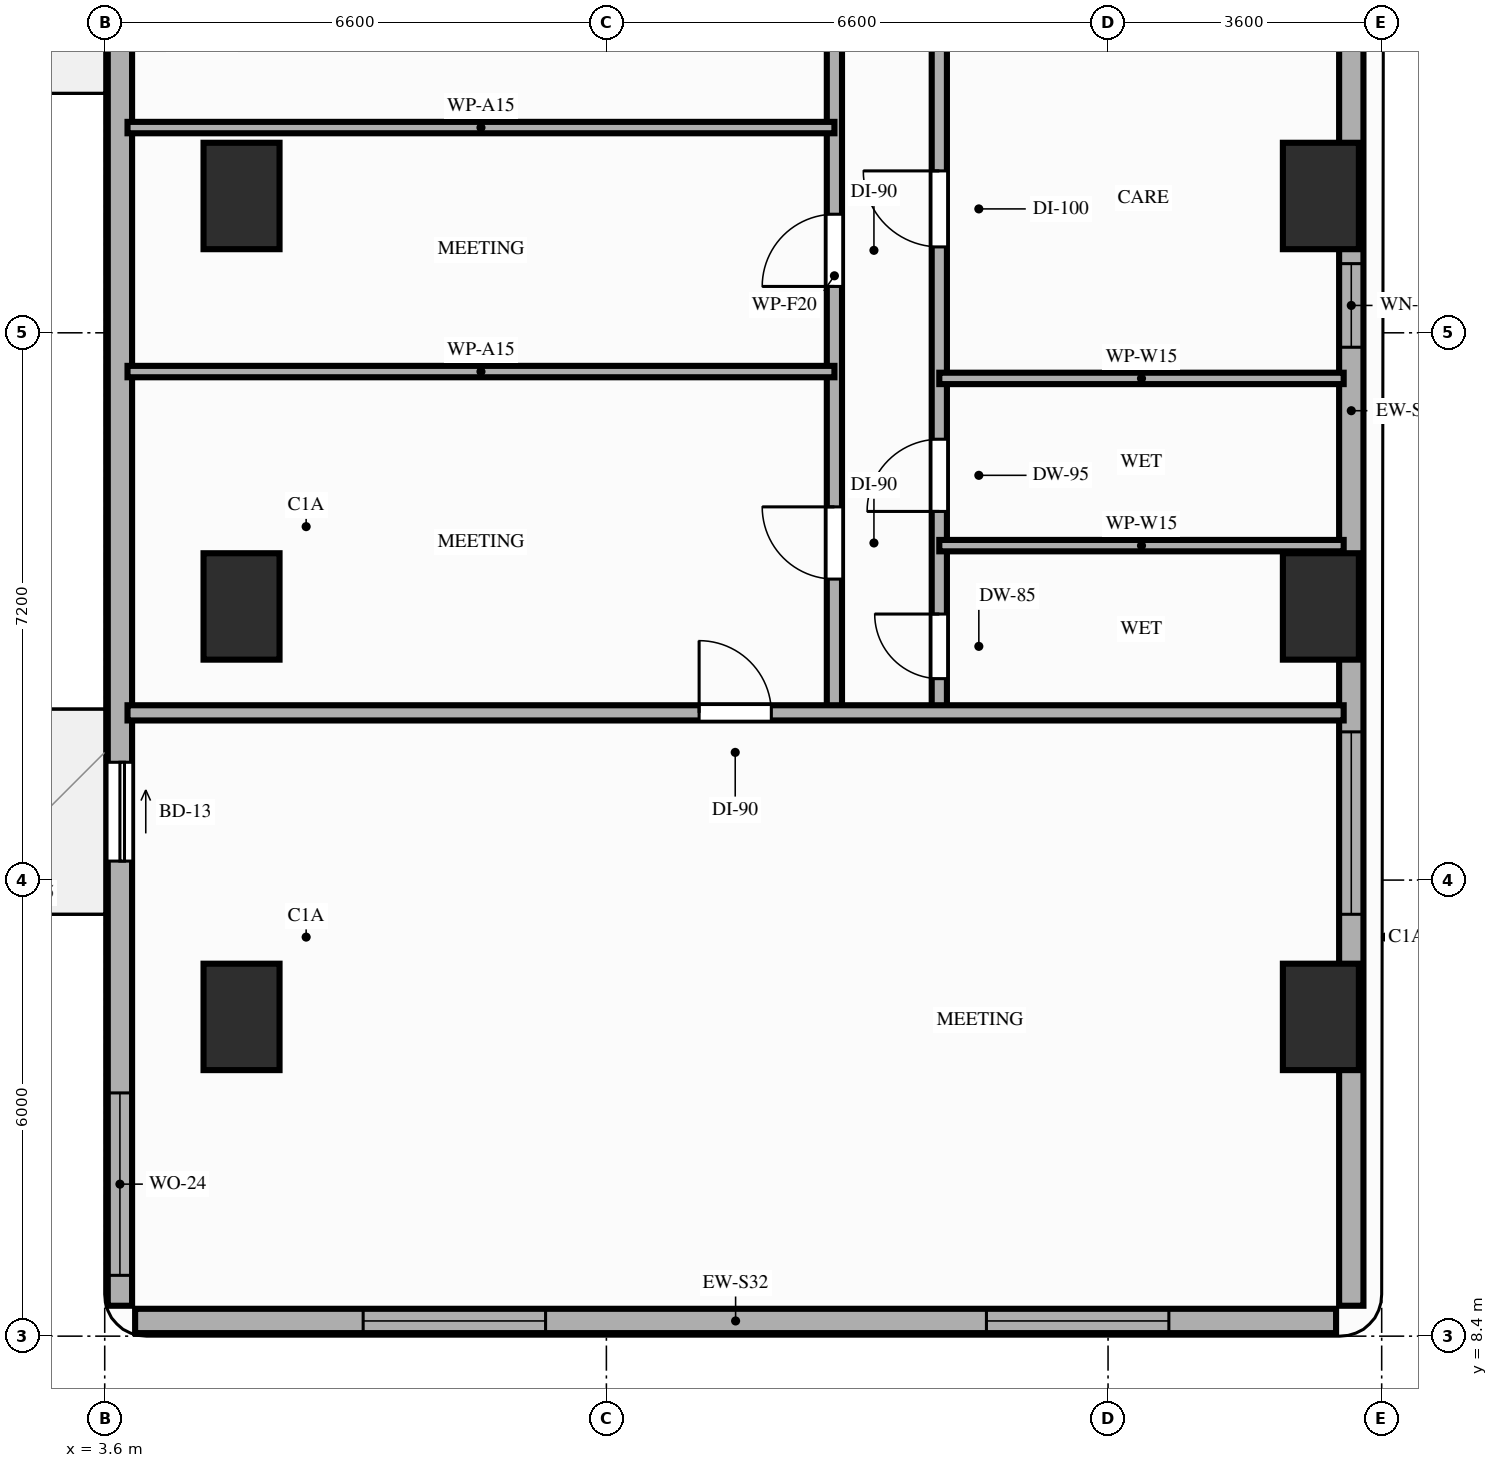
"""IFC4 building model, lengths in metres.
Left out: names, types, materials, properties, quantities, classifications, styles, units other than length and angle.
Written with IfcOpenShell. Run it as: python <this file> out.ifc"""

import sys

from ifc_helpers import new_model, si_unit, direction, frame, frame_2d, origin, origin_2d, place, context, subcontext, project, spatial, rectangle, extrude, element, fill, save


model = new_model("IFC4")
c1 = context("Model", 3, precision=1e-05, world=origin(), true_north=direction((0.0, 1.0)))
c2 = subcontext(c1, "Body", "Model", "MODEL_VIEW")
j1 = project(units=[si_unit("LENGTHUNIT", "METRE"), si_unit("PLANEANGLEUNIT", "RADIAN")], contexts=[c1])
p1 = place(None, origin())
s1 = spatial("IfcSite", under=j1, at=p1, CompositionType="ELEMENT")
p2 = place(p1, origin())
s2 = spatial("IfcBuilding", under=s1, at=p2, CompositionType="ELEMENT")
p3 = place(p2, frame((0.0, 0.0, 30.2)))
s3 = spatial("IfcBuildingStorey", under=s2, at=p3, CompositionType="ELEMENT", Elevation=30.2)
for number, where, z_axis, x_axis in (
    (1, (5.4, 12.6, 0.0), (0.0, 0.0, 1.0), (1.0, 0.0, 0.0)),
    (2, (19.6, 12.6, 0.0), (0.0, 0.0, 1.0), (1.0, 0.0, 0.0)),
    (3, (5.4, 18.0, 0.0), (0.0, 0.0, 1.0), (1.0, 0.0, 0.0)),
    (4, (19.6, 18.0, 0.0), (0.0, 0.0, 1.0), (1.0, 0.0, 0.0)),
    (5, (5.4, 23.4, 0.0), (0.0, 0.0, 1.0), (1.0, 0.0, 0.0)),
    (6, (19.6, 23.4, 0.0), (0.0, 0.0, 1.0), (1.0, 0.0, 0.0)),
):
    element("IfcColumn", number, at=place(p3, frame(where, z_axis=z_axis, x_axis=x_axis)), inside=s3, PredefinedType="COLUMN", context=c2, shape_type="SweptSolid", body=[
        extrude(rectangle(XDim=1.0, YDim=1.4, at=origin_2d()), origin(), (0.0, 0.0, 1.0), 3.2),
    ])
p4 = place(p3, frame((4.0, 8.6, 0.0), z_axis=(0.0, 0.0, 1.0), x_axis=(1.0, 0.0, 0.0)))
e7 = element("IfcWall", 7, at=p4, inside=s3, PredefinedType="STANDARD", context=c2, shape_type="SweptSolid", body=[
    extrude(rectangle(XDim=15.8, YDim=0.32, at=frame_2d((7.9, 0.0))), origin(), (0.0, 0.0, 1.0), 3.02),
])
p5 = place(p4, frame((3.0, 0.0, 0.85)))
e8 = element("IfcOpeningElement", 8, at=p5, cuts=e7, PredefinedType="OPENING", context=c2, shape_type="SweptSolid", body=[
    extrude(rectangle(XDim=2.4, YDim=1.8, at=frame_2d((1.2, 0.9))), frame((0.0, 0.17, 0.0), z_axis=(0.0, -1.0, 0.0), x_axis=(1.0, 0.0, 0.0)), (0.0, 0.0, 1.0), 0.34),
])
p6 = place(p4, frame((11.2, 0.0, 0.85)))
e9 = element("IfcOpeningElement", 9, at=p6, cuts=e7, PredefinedType="OPENING", context=c2, shape_type="SweptSolid", body=[
    extrude(rectangle(XDim=2.4, YDim=1.8, at=frame_2d((1.2, 0.9))), frame((0.0, 0.17, 0.0), z_axis=(0.0, -1.0, 0.0), x_axis=(1.0, 0.0, 0.0)), (0.0, 0.0, 1.0), 0.34),
])
p7 = place(p3, frame((3.8, 42.1, 0.0), z_axis=(0.0, 0.0, 1.0), x_axis=(0.0, -1.0, 0.0)))
e10 = element("IfcWall", 10, at=p7, inside=s3, PredefinedType="STANDARD", context=c2, shape_type="SweptSolid", body=[
    extrude(rectangle(XDim=33.3, YDim=0.32, at=frame_2d((16.65, 0.0))), origin(), (0.0, 0.0, 1.0), 2.71),
])
p8 = place(p7, frame((26.15, 0.0, 0.0)))
e11 = element("IfcOpeningElement", 11, at=p8, cuts=e10, PredefinedType="OPENING", context=c2, shape_type="SweptSolid", body=[
    extrude(rectangle(XDim=1.3, YDim=2.08, at=frame_2d((0.65, 1.04))), frame((0.0, 0.17, 0.0), z_axis=(0.0, -1.0, 0.0), x_axis=(1.0, 0.0, 0.0)), (0.0, 0.0, 1.0), 0.34),
])
p9 = place(p7, frame((15.35, 0.0, 0.0)))
e12 = element("IfcOpeningElement", 12, at=p9, cuts=e10, PredefinedType="OPENING", context=c2, shape_type="SweptSolid", body=[
    extrude(rectangle(XDim=1.3, YDim=2.08, at=frame_2d((0.65, 1.04))), frame((0.0, 0.17, 0.0), z_axis=(0.0, -1.0, 0.0), x_axis=(1.0, 0.0, 0.0)), (0.0, 0.0, 1.0), 0.34),
])
p10 = place(p7, frame((30.5, 0.0, 0.85)))
e13 = element("IfcOpeningElement", 13, at=p10, cuts=e10, PredefinedType="OPENING", context=c2, shape_type="SweptSolid", body=[
    extrude(rectangle(XDim=2.4, YDim=1.61, at=frame_2d((1.2, 0.805))), frame((0.0, 0.17, 0.0), z_axis=(0.0, -1.0, 0.0), x_axis=(1.0, 0.0, 0.0)), (0.0, 0.0, 1.0), 0.34),
])
p11 = place(p7, frame((9.6, 0.0, 0.85)))
e14 = element("IfcOpeningElement", 14, at=p11, cuts=e10, PredefinedType="OPENING", context=c2, shape_type="SweptSolid", body=[
    extrude(rectangle(XDim=2.4, YDim=1.61, at=frame_2d((1.2, 0.805))), frame((0.0, 0.17, 0.0), z_axis=(0.0, -1.0, 0.0), x_axis=(1.0, 0.0, 0.0)), (0.0, 0.0, 1.0), 0.34),
])
p12 = place(p7, frame((3.5, 0.0, 0.85)))
e15 = element("IfcOpeningElement", 15, at=p12, cuts=e10, PredefinedType="OPENING", context=c2, shape_type="SweptSolid", body=[
    extrude(rectangle(XDim=2.4, YDim=1.61, at=frame_2d((1.2, 0.805))), frame((0.0, 0.17, 0.0), z_axis=(0.0, -1.0, 0.0), x_axis=(1.0, 0.0, 0.0)), (0.0, 0.0, 1.0), 0.34),
])
p13 = place(p3, frame((20.0, 8.8, 0.0), z_axis=(0.0, 0.0, 1.0), x_axis=(0.0, 1.0, 0.0)))
e16 = element("IfcWall", 16, at=p13, inside=s3, PredefinedType="STANDARD", context=c2, shape_type="SweptSolid", body=[
    extrude(rectangle(XDim=23.55, YDim=0.32, at=frame_2d((11.775, 0.0))), origin(), (0.0, 0.0, 1.0), 2.41),
])
p14 = place(p13, frame((12.61, 0.0, 0.85)))
e17 = element("IfcOpeningElement", 17, at=p14, cuts=e16, PredefinedType="OPENING", context=c2, shape_type="SweptSolid", body=[
    extrude(rectangle(XDim=1.1, YDim=1.31, at=frame_2d((0.55, 0.655))), frame((0.0, 0.17, 0.0), z_axis=(0.0, -1.0, 0.0), x_axis=(1.0, 0.0, 0.0)), (0.0, 0.0, 1.0), 0.34),
])
p15 = place(p13, frame((5.15, 0.0, 0.85)))
e18 = element("IfcOpeningElement", 18, at=p15, cuts=e16, PredefinedType="OPENING", context=c2, shape_type="SweptSolid", body=[
    extrude(rectangle(XDim=2.4, YDim=1.31, at=frame_2d((1.2, 0.655))), frame((0.0, 0.17, 0.0), z_axis=(0.0, -1.0, 0.0), x_axis=(1.0, 0.0, 0.0)), (0.0, 0.0, 1.0), 0.34),
])
p16 = place(p3, frame((13.2, 16.6, 0.0), z_axis=(0.0, 0.0, 1.0), x_axis=(0.0, 1.0, 0.0)))
e19 = element("IfcWall", 19, at=p16, inside=s3, PredefinedType="PARTITIONING", context=c2, shape_type="SweptSolid", body=[
    extrude(rectangle(XDim=11.5, YDim=0.2, at=frame_2d((5.75, 0.0))), origin(), (0.0, 0.0, 1.0), 2.41),
])
p17 = place(p16, frame((1.76, 0.0, 0.0)))
e20 = element("IfcOpeningElement", 20, at=p17, cuts=e19, PredefinedType="OPENING", context=c2, shape_type="SweptSolid", body=[
    extrude(rectangle(XDim=0.95, YDim=2.15, at=frame_2d((0.475, 1.075))), frame((0.0, 0.11, 0.0), z_axis=(0.0, -1.0, 0.0), x_axis=(1.0, 0.0, 0.0)), (0.0, 0.0, 1.0), 0.22),
])
p18 = place(p16, frame((5.61, 0.0, 0.0)))
e21 = element("IfcOpeningElement", 21, at=p18, cuts=e19, PredefinedType="OPENING", context=c2, shape_type="SweptSolid", body=[
    extrude(rectangle(XDim=0.95, YDim=2.15, at=frame_2d((0.475, 1.075))), frame((0.0, 0.11, 0.0), z_axis=(0.0, -1.0, 0.0), x_axis=(1.0, 0.0, 0.0)), (0.0, 0.0, 1.0), 0.22),
])
p19 = place(p16, frame((9.12, 0.0, 0.0)))
e22 = element("IfcOpeningElement", 22, at=p19, cuts=e19, PredefinedType="OPENING", context=c2, shape_type="SweptSolid", body=[
    extrude(rectangle(XDim=0.95, YDim=2.15, at=frame_2d((0.475, 1.075))), frame((0.0, 0.11, 0.0), z_axis=(0.0, -1.0, 0.0), x_axis=(1.0, 0.0, 0.0)), (0.0, 0.0, 1.0), 0.22),
])
p20 = place(p3, frame((14.58, 16.6, 0.0), z_axis=(0.0, 0.0, 1.0), x_axis=(0.0, 1.0, 0.0)))
e23 = element("IfcWall", 23, at=p20, inside=s3, PredefinedType="PARTITIONING", context=c2, shape_type="SweptSolid", body=[
    extrude(rectangle(XDim=11.5, YDim=0.2, at=frame_2d((5.75, 0.0))), origin(), (0.0, 0.0, 1.0), 2.41),
])
p21 = place(p20, frame((0.45, 0.0, 0.0)))
e24 = element("IfcOpeningElement", 24, at=p21, cuts=e23, PredefinedType="OPENING", context=c2, shape_type="SweptSolid", body=[
    extrude(rectangle(XDim=0.85, YDim=2.1, at=frame_2d((0.425, 1.05))), frame((0.0, 0.11, 0.0), z_axis=(0.0, -1.0, 0.0), x_axis=(1.0, 0.0, 0.0)), (0.0, 0.0, 1.0), 0.22),
])
p22 = place(p20, frame((2.65, 0.0, 0.0)))
e25 = element("IfcOpeningElement", 25, at=p22, cuts=e23, PredefinedType="OPENING", context=c2, shape_type="SweptSolid", body=[
    extrude(rectangle(XDim=0.95, YDim=2.1, at=frame_2d((0.475, 1.05))), frame((0.0, 0.11, 0.0), z_axis=(0.0, -1.0, 0.0), x_axis=(1.0, 0.0, 0.0)), (0.0, 0.0, 1.0), 0.22),
])
p23 = place(p20, frame((6.13, 0.0, 0.0)))
e26 = element("IfcOpeningElement", 26, at=p23, cuts=e23, PredefinedType="OPENING", context=c2, shape_type="SweptSolid", body=[
    extrude(rectangle(XDim=1.0, YDim=2.15, at=frame_2d((0.5, 1.075))), frame((0.0, 0.11, 0.0), z_axis=(0.0, -1.0, 0.0), x_axis=(1.0, 0.0, 0.0)), (0.0, 0.0, 1.0), 0.22),
])
p24 = place(p20, frame((9.68, 0.0, 0.0)))
e27 = element("IfcOpeningElement", 27, at=p24, cuts=e23, PredefinedType="OPENING", context=c2, shape_type="SweptSolid", body=[
    extrude(rectangle(XDim=1.0, YDim=2.15, at=frame_2d((0.5, 1.075))), frame((0.0, 0.11, 0.0), z_axis=(0.0, -1.0, 0.0), x_axis=(1.0, 0.0, 0.0)), (0.0, 0.0, 1.0), 0.22),
])
p25 = place(p3, frame((3.9, 16.6, 0.0), z_axis=(0.0, 0.0, 1.0), x_axis=(1.0, 0.0, 0.0)))
e28 = element("IfcWall", 28, at=p25, inside=s3, PredefinedType="PARTITIONING", context=c2, shape_type="SweptSolid", body=[
    extrude(rectangle(XDim=16.0, YDim=0.2, at=frame_2d((8.0, 0.0))), origin(), (0.0, 0.0, 1.0), 2.41),
])
p26 = place(p25, frame((7.52, 0.0, 0.0)))
e29 = element("IfcOpeningElement", 29, at=p26, cuts=e28, PredefinedType="OPENING", context=c2, shape_type="SweptSolid", body=[
    extrude(rectangle(XDim=0.95, YDim=2.15, at=frame_2d((0.475, 1.075))), frame((0.0, 0.11, 0.0), z_axis=(0.0, -1.0, 0.0), x_axis=(1.0, 0.0, 0.0)), (0.0, 0.0, 1.0), 0.22),
])
for number, where, z_axis, x_axis in (
    (30, (3.9, 21.09, 0.0), (0.0, 0.0, 1.0), (1.0, 0.0, 0.0)),
    (31, (3.9, 24.3, 0.0), (0.0, 0.0, 1.0), (1.0, 0.0, 0.0)),
):
    element("IfcWall", number, at=place(p3, frame(where, z_axis=z_axis, x_axis=x_axis)), inside=s3, PredefinedType="PARTITIONING", context=c2, shape_type="SweptSolid", body=[
        extrude(rectangle(XDim=9.3, YDim=0.15, at=frame_2d((4.65, 0.0))), origin(), (0.0, 0.0, 1.0), 2.41),
    ])
for number, where, z_axis, x_axis in (
    (32, (14.58, 18.8, 0.0), (0.0, 0.0, 1.0), (1.0, 0.0, 0.0)),
    (33, (14.58, 21.0, 0.0), (0.0, 0.0, 1.0), (1.0, 0.0, 0.0)),
):
    element("IfcWall", number, at=place(p3, frame(where, z_axis=z_axis, x_axis=x_axis)), inside=s3, PredefinedType="PARTITIONING", context=c2, shape_type="SweptSolid", body=[
        extrude(rectangle(XDim=5.32, YDim=0.15, at=frame_2d((2.66, 0.0))), origin(), (0.0, 0.0, 1.0), 2.41),
    ])
p27 = place(p8, origin())
e34 = element("IfcDoor", 34, at=p27, inside=s3, OperationType="SLIDING_TO_LEFT", PredefinedType="DOOR", context=c2, shape_type="SweptSolid", body=[
    extrude(rectangle(XDim=1.3, YDim=2.08, at=frame_2d((0.65, 1.04))), frame((0.0, 0.025, 0.0), z_axis=(0.0, -1.0, 0.0), x_axis=(1.0, 0.0, 0.0)), (0.0, 0.0, 1.0), 0.05),
])
fill(e11, e34)
p28 = place(p14, origin())
e35 = element("IfcWindow", 35, at=p28, inside=s3, PartitioningType="SINGLE_PANEL", PredefinedType="WINDOW", context=c2, shape_type="SweptSolid", body=[
    extrude(rectangle(XDim=1.1, YDim=1.31, at=frame_2d((0.55, 0.655))), frame((0.0, 0.03, 0.0), z_axis=(0.0, -1.0, 0.0), x_axis=(1.0, 0.0, 0.0)), (0.0, 0.0, 1.0), 0.06),
])
fill(e17, e35)
p29 = place(p10, origin())
e36 = element("IfcWindow", 36, at=p29, inside=s3, PartitioningType="SINGLE_PANEL", PredefinedType="WINDOW", context=c2, shape_type="SweptSolid", body=[
    extrude(rectangle(XDim=2.4, YDim=1.61, at=frame_2d((1.2, 0.805))), frame((0.0, 0.03, 0.0), z_axis=(0.0, -1.0, 0.0), x_axis=(1.0, 0.0, 0.0)), (0.0, 0.0, 1.0), 0.06),
])
fill(e13, e36)
p30 = place(p15, origin())
e37 = element("IfcWindow", 37, at=p30, inside=s3, PartitioningType="SINGLE_PANEL", PredefinedType="WINDOW", context=c2, shape_type="SweptSolid", body=[
    extrude(rectangle(XDim=2.4, YDim=1.31, at=frame_2d((1.2, 0.655))), frame((0.0, 0.03, 0.0), z_axis=(0.0, -1.0, 0.0), x_axis=(1.0, 0.0, 0.0)), (0.0, 0.0, 1.0), 0.06),
])
fill(e18, e37)
p31 = place(p5, origin())
e38 = element("IfcWindow", 38, at=p31, inside=s3, PartitioningType="SINGLE_PANEL", PredefinedType="WINDOW", context=c2, shape_type="SweptSolid", body=[
    extrude(rectangle(XDim=2.4, YDim=1.8, at=frame_2d((1.2, 0.9))), frame((0.0, 0.03, 0.0), z_axis=(0.0, -1.0, 0.0), x_axis=(1.0, 0.0, 0.0)), (0.0, 0.0, 1.0), 0.06),
])
fill(e8, e38)
p32 = place(p6, origin())
e39 = element("IfcWindow", 39, at=p32, inside=s3, PartitioningType="SINGLE_PANEL", PredefinedType="WINDOW", context=c2, shape_type="SweptSolid", body=[
    extrude(rectangle(XDim=2.4, YDim=1.8, at=frame_2d((1.2, 0.9))), frame((0.0, 0.03, 0.0), z_axis=(0.0, -1.0, 0.0), x_axis=(1.0, 0.0, 0.0)), (0.0, 0.0, 1.0), 0.06),
])
fill(e9, e39)
p33 = place(p17, origin())
e40 = element("IfcDoor", 40, at=p33, inside=s3, OperationType="SINGLE_SWING_RIGHT", PredefinedType="DOOR", context=c2, shape_type="SweptSolid", body=[
    extrude(rectangle(XDim=0.95, YDim=2.15, at=frame_2d((0.475, 1.075))), frame((0.0, 0.025, 0.0), z_axis=(0.0, -1.0, 0.0), x_axis=(1.0, 0.0, 0.0)), (0.0, 0.0, 1.0), 0.05),
])
fill(e20, e40)
p34 = place(p18, origin())
e41 = element("IfcDoor", 41, at=p34, inside=s3, OperationType="SINGLE_SWING_LEFT", PredefinedType="DOOR", context=c2, shape_type="SweptSolid", body=[
    extrude(rectangle(XDim=0.95, YDim=2.15, at=frame_2d((0.475, 1.075))), frame((0.0, 0.025, 0.0), z_axis=(0.0, -1.0, 0.0), x_axis=(1.0, 0.0, 0.0)), (0.0, 0.0, 1.0), 0.05),
])
fill(e21, e41)
p35 = place(p26, origin())
e42 = element("IfcDoor", 42, at=p35, inside=s3, OperationType="SINGLE_SWING_LEFT", PredefinedType="DOOR", context=c2, shape_type="SweptSolid", body=[
    extrude(rectangle(XDim=0.95, YDim=2.15, at=frame_2d((0.475, 1.075))), frame((0.0, 0.025, 0.0), z_axis=(0.0, -1.0, 0.0), x_axis=(1.0, 0.0, 0.0)), (0.0, 0.0, 1.0), 0.05),
])
fill(e29, e42)
p36 = place(p21, origin())
e43 = element("IfcDoor", 43, at=p36, inside=s3, OperationType="SINGLE_SWING_RIGHT", PredefinedType="DOOR", context=c2, shape_type="SweptSolid", body=[
    extrude(rectangle(XDim=0.85, YDim=2.1, at=frame_2d((0.425, 1.05))), frame((0.0, 0.025, 0.0), z_axis=(0.0, -1.0, 0.0), x_axis=(1.0, 0.0, 0.0)), (0.0, 0.0, 1.0), 0.05),
])
fill(e24, e43)
p37 = place(p22, origin())
e44 = element("IfcDoor", 44, at=p37, inside=s3, OperationType="SINGLE_SWING_LEFT", PredefinedType="DOOR", context=c2, shape_type="SweptSolid", body=[
    extrude(rectangle(XDim=0.95, YDim=2.1, at=frame_2d((0.475, 1.05))), frame((0.0, 0.025, 0.0), z_axis=(0.0, -1.0, 0.0), x_axis=(1.0, 0.0, 0.0)), (0.0, 0.0, 1.0), 0.05),
])
fill(e25, e44)
p38 = place(p23, origin())
e45 = element("IfcDoor", 45, at=p38, inside=s3, OperationType="SINGLE_SWING_RIGHT", PredefinedType="DOOR", context=c2, shape_type="SweptSolid", body=[
    extrude(rectangle(XDim=1.0, YDim=2.15, at=frame_2d((0.5, 1.075))), frame((0.0, 0.025, 0.0), z_axis=(0.0, -1.0, 0.0), x_axis=(1.0, 0.0, 0.0)), (0.0, 0.0, 1.0), 0.05),
])
fill(e26, e45)
save(model, sys.argv[1])
